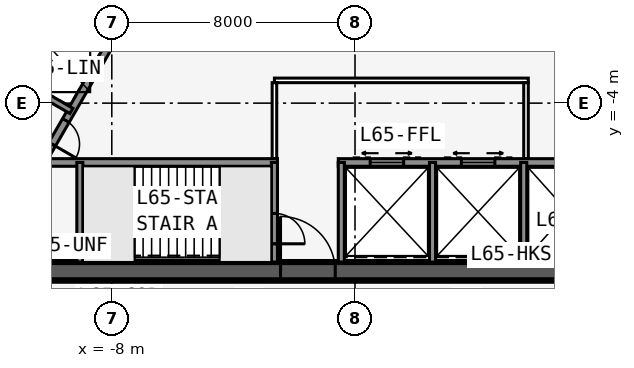
"""IFC4 building model, lengths in metres.
Left out: names, types, materials, properties, quantities, classifications, styles, units other than length and angle.
Written with IfcOpenShell. Run it as: python <this file> out.ifc"""

import sys

from ifc_helpers import new_model, si_unit, direction, frame, frame_2d, origin, place, context, subcontext, project, spatial, rectangle, extrude, element, fill, save


model = new_model("IFC4")
c1 = context("Model", 3, precision=1e-05, world=origin(), true_north=direction((0.0, 1.0)))
c2 = subcontext(c1, "Body", "Model", "MODEL_VIEW")
j1 = project(units=[si_unit("LENGTHUNIT", "METRE"), si_unit("PLANEANGLEUNIT", "RADIAN")], contexts=[c1])
p1 = place(None, origin())
s1 = spatial("IfcSite", under=j1, at=p1, CompositionType="ELEMENT")
p2 = place(p1, origin())
s2 = spatial("IfcBuilding", under=s1, at=p2, CompositionType="ELEMENT")
p3 = place(p2, frame((0.0, 0.0, 246.5)))
s3 = spatial("IfcBuildingStorey", under=s2, at=p3, CompositionType="ELEMENT", Elevation=246.5)
p4 = place(p3, frame((-16.5, -9.526, 0.0), z_axis=(0.0, 0.0, 1.0), x_axis=(1.0, 0.0, 0.0)))
e1 = element("IfcWall", 1, at=p4, inside=s3, PredefinedType="SHEAR", context=c2, shape_type="SweptSolid", body=[
    extrude(rectangle(XDim=33.0, YDim=0.6, at=frame_2d((16.5, 0.0))), origin(), (0.0, 0.0, 1.0), 3.6),
])
p5 = place(p4, frame((14.05, 0.0, 0.0)))
e2 = element("IfcOpeningElement", 2, at=p5, cuts=e1, PredefinedType="OPENING", context=c2, shape_type="SweptSolid", body=[
    extrude(rectangle(XDim=1.8, YDim=2.13, at=frame_2d((0.9, 1.065))), frame((0.0, 0.31, 0.0), z_axis=(0.0, -1.0, 0.0), x_axis=(1.0, 0.0, 0.0)), (0.0, 0.0, 1.0), 0.62),
])
p6 = place(p3, frame((-10.183, -5.951, 0.0), z_axis=(0.0, 0.0, 1.0), x_axis=(1.0, 0.0, 0.0)))
e3 = element("IfcWall", 3, at=p6, inside=s3, PredefinedType="SOLIDWALL", context=c2, shape_type="SweptSolid", body=[
    extrude(rectangle(XDim=7.633, YDim=0.25, at=frame_2d((3.816, 0.0))), origin(), (0.0, 0.0, 1.0), 3.435),
])
p7 = place(p3, frame((-0.55, -5.951, 0.0), z_axis=(0.0, 0.0, 1.0), x_axis=(1.0, 0.0, 0.0)))
e4 = element("IfcWall", 4, at=p7, inside=s3, PredefinedType="SOLIDWALL", context=c2, shape_type="SweptSolid", body=[
    extrude(rectangle(XDim=10.733, YDim=0.25, at=frame_2d((5.366, 0.0))), origin(), (0.0, 0.0, 1.0), 3.435),
])
p8 = place(p7, frame((9.314, 0.0, 0.0)))
e5 = element("IfcOpeningElement", 5, at=p8, cuts=e4, PredefinedType="OPENING", context=c2, shape_type="SweptSolid", body=[
    extrude(rectangle(XDim=0.9, YDim=2.13, at=frame_2d((0.45, 1.065))), frame((0.0, 0.135, 0.0), z_axis=(0.0, -1.0, 0.0), x_axis=(1.0, 0.0, 0.0)), (0.0, 0.0, 1.0), 0.27),
])
p9 = place(p7, frame((1.05, 0.0, 0.0)))
e6 = element("IfcOpeningElement", 6, at=p9, cuts=e4, PredefinedType="OPENING", context=c2, shape_type="SweptSolid", body=[
    extrude(rectangle(XDim=1.1, YDim=2.13, at=frame_2d((0.55, 1.065))), frame((0.0, 0.135, 0.0), z_axis=(0.0, -1.0, 0.0), x_axis=(1.0, 0.0, 0.0)), (0.0, 0.0, 1.0), 0.27),
])
p10 = place(p7, frame((4.05, 0.0, 0.0)))
e7 = element("IfcOpeningElement", 7, at=p10, cuts=e4, PredefinedType="OPENING", context=c2, shape_type="SweptSolid", body=[
    extrude(rectangle(XDim=1.1, YDim=2.13, at=frame_2d((0.55, 1.065))), frame((0.0, 0.135, 0.0), z_axis=(0.0, -1.0, 0.0), x_axis=(1.0, 0.0, 0.0)), (0.0, 0.0, 1.0), 0.27),
])
p11 = place(p3, frame((-9.05, -5.951, 0.0), z_axis=(0.0, 0.0, 1.0), x_axis=(0.0, -1.0, 0.0)))
e8 = element("IfcWall", 8, at=p11, inside=s3, PredefinedType="SOLIDWALL", context=c2, shape_type="SweptSolid", body=[
    extrude(rectangle(XDim=3.275, YDim=0.2, at=frame_2d((1.637, 0.0))), origin(), (0.0, 0.0, 1.0), 3.435),
])
p12 = place(p3, frame((-2.65, -5.951, 0.0), z_axis=(0.0, 0.0, 1.0), x_axis=(0.0, -1.0, 0.0)))
e9 = element("IfcWall", 9, at=p12, inside=s3, PredefinedType="SOLIDWALL", context=c2, shape_type="SweptSolid", body=[
    extrude(rectangle(XDim=3.275, YDim=0.2, at=frame_2d((1.637, 0.0))), origin(), (0.0, 0.0, 1.0), 3.435),
])
p13 = place(p12, frame((1.675, 0.0, 0.0)))
e10 = element("IfcOpeningElement", 10, at=p13, cuts=e9, PredefinedType="OPENING", context=c2, shape_type="SweptSolid", body=[
    extrude(rectangle(XDim=1.0, YDim=2.13, at=frame_2d((0.5, 1.065))), frame((0.0, 0.11, 0.0), z_axis=(0.0, -1.0, 0.0), x_axis=(1.0, 0.0, 0.0)), (0.0, 0.0, 1.0), 0.22),
])
for number, where, z_axis, x_axis in (
    (11, (-0.45, -5.951, 0.0), (0.0, 0.0, 1.0), (0.0, -1.0, 0.0)),
    (12, (2.55, -5.951, 0.0), (0.0, 0.0, 1.0), (0.0, -1.0, 0.0)),
    (13, (5.55, -5.951, 0.0), (0.0, 0.0, 1.0), (0.0, -1.0, 0.0)),
):
    element("IfcWall", number, at=place(p3, frame(where, z_axis=z_axis, x_axis=x_axis)), inside=s3, PredefinedType="SOLIDWALL", context=c2, shape_type="SweptSolid", body=[
        extrude(rectangle(XDim=3.275, YDim=0.2, at=frame_2d((1.637, 0.0))), origin(), (0.0, 0.0, 1.0), 3.435),
    ])
p14 = place(p3, frame((16.5, -9.526, 0.0), z_axis=(0.0, 0.0, 1.0), x_axis=(-0.499999749417, 0.866025548458, 0.0)))
e14 = element("IfcWall", 14, at=p14, inside=s3, PredefinedType="SHEAR", context=c2, shape_type="SweptSolid", body=[
    extrude(rectangle(XDim=33.0, YDim=0.6, at=frame_2d((16.5, 0.0))), origin(), (0.0, 0.0, 1.0), 3.6),
])
p15 = place(p14, frame((14.15, 0.0, 0.0)))
e15 = element("IfcOpeningElement", 15, at=p15, cuts=e14, PredefinedType="OPENING", context=c2, shape_type="SweptSolid", body=[
    extrude(rectangle(XDim=1.8, YDim=2.13, at=frame_2d((0.9, 1.065))), frame((0.0, 0.31, 0.0), z_axis=(0.0, -1.0, 0.0), x_axis=(1.0, 0.0, 0.0)), (0.0, 0.0, 1.0), 0.62),
])
p16 = place(p14, frame((12.6, 0.0, 0.0)))
e16 = element("IfcOpeningElement", 16, at=p16, cuts=e14, PredefinedType="OPENING", context=c2, shape_type="SweptSolid", body=[
    extrude(rectangle(XDim=1.0, YDim=2.13, at=frame_2d((0.5, 1.065))), frame((0.0, 0.31, 0.0), z_axis=(0.0, -1.0, 0.0), x_axis=(1.0, 0.0, 0.0)), (0.0, 0.0, 1.0), 0.62),
])
p17 = place(p3, frame((10.245, -5.843, 0.0), z_axis=(0.0, 0.0, 1.0), x_axis=(-0.499993009313, 0.866029439822, 0.0)))
e17 = element("IfcWall", 17, at=p17, inside=s3, PredefinedType="SOLIDWALL", context=c2, shape_type="SweptSolid", body=[
    extrude(rectangle(XDim=7.733, YDim=0.25, at=frame_2d((3.866, 0.0))), origin(), (0.0, 0.0, 1.0), 3.435),
])
p18 = place(p3, frame((0.0, 19.052, 0.0), z_axis=(0.0, 0.0, 1.0), x_axis=(-0.499999749417, -0.866025548458, 0.0)))
e18 = element("IfcWall", 18, at=p18, inside=s3, PredefinedType="SHEAR", context=c2, shape_type="SweptSolid", body=[
    extrude(rectangle(XDim=33.0, YDim=0.6, at=frame_2d((16.5, 0.0))), origin(), (0.0, 0.0, 1.0), 3.6),
])
p19 = place(p18, frame((14.15, 0.0, 0.0)))
e19 = element("IfcOpeningElement", 19, at=p19, cuts=e18, PredefinedType="OPENING", context=c2, shape_type="SweptSolid", body=[
    extrude(rectangle(XDim=1.8, YDim=2.13, at=frame_2d((0.9, 1.065))), frame((0.0, 0.31, 0.0), z_axis=(0.0, -1.0, 0.0), x_axis=(1.0, 0.0, 0.0)), (0.0, 0.0, 1.0), 0.62),
])
p20 = place(p18, frame((12.6, 0.0, 0.0)))
e20 = element("IfcOpeningElement", 20, at=p20, cuts=e18, PredefinedType="OPENING", context=c2, shape_type="SweptSolid", body=[
    extrude(rectangle(XDim=1.0, YDim=2.13, at=frame_2d((0.5, 1.065))), frame((0.0, 0.31, 0.0), z_axis=(0.0, -1.0, 0.0), x_axis=(1.0, 0.0, 0.0)), (0.0, 0.0, 1.0), 0.62),
])
p21 = place(p3, frame((-4.929, 3.365, 0.0), z_axis=(0.0, 0.0, 1.0), x_axis=(-0.499991433582, -0.866030349552, 0.0)))
e21 = element("IfcWall", 21, at=p21, inside=s3, PredefinedType="SOLIDWALL", context=c2, shape_type="SweptSolid", body=[
    extrude(rectangle(XDim=10.633, YDim=0.25, at=frame_2d((5.316, 0.0))), origin(), (0.0, 0.0, 1.0), 3.435),
])
p22 = place(p21, frame((9.164, 0.0, 0.0)))
e22 = element("IfcOpeningElement", 22, at=p22, cuts=e21, PredefinedType="OPENING", context=c2, shape_type="SweptSolid", body=[
    extrude(rectangle(XDim=0.9, YDim=2.13, at=frame_2d((0.45, 1.065))), frame((0.0, 0.135, 0.0), z_axis=(0.0, -1.0, 0.0), x_axis=(1.0, 0.0, 0.0)), (0.0, 0.0, 1.0), 0.27),
])
p23 = place(p21, frame((1.1, 0.0, 0.0)))
e23 = element("IfcOpeningElement", 23, at=p23, cuts=e21, PredefinedType="OPENING", context=c2, shape_type="SweptSolid", body=[
    extrude(rectangle(XDim=0.9, YDim=2.13, at=frame_2d((0.45, 1.065))), frame((0.0, 0.135, 0.0), z_axis=(0.0, -1.0, 0.0), x_axis=(1.0, 0.0, 0.0)), (0.0, 0.0, 1.0), 0.27),
])
p24 = place(p21, frame((4.0, 0.0, 0.0)))
e24 = element("IfcOpeningElement", 24, at=p24, cuts=e21, PredefinedType="OPENING", context=c2, shape_type="SweptSolid", body=[
    extrude(rectangle(XDim=0.9, YDim=2.13, at=frame_2d((0.45, 1.065))), frame((0.0, 0.135, 0.0), z_axis=(0.0, -1.0, 0.0), x_axis=(1.0, 0.0, 0.0)), (0.0, 0.0, 1.0), 0.27),
])
p25 = place(p3, frame((-9.329, -4.256, 0.0), z_axis=(0.0, 0.0, 1.0), x_axis=(-0.866027924134, 0.499995634601, 0.0)))
e25 = element("IfcWall", 25, at=p25, inside=s3, PredefinedType="SOLIDWALL", context=c2, shape_type="SweptSolid", body=[
    extrude(rectangle(XDim=3.275, YDim=0.2, at=frame_2d((1.637, 0.0))), origin(), (0.0, 0.0, 1.0), 3.435),
])
p26 = place(p3, frame((-0.35, 23.096, 0.0), z_axis=(0.0, 0.0, 1.0), x_axis=(-0.499998875317, -0.866026053119, 0.0)))
e26 = element("IfcWall", 26, at=p26, inside=s3, PredefinedType="PARTITIONING", context=c2, shape_type="SweptSolid", body=[
    extrude(rectangle(XDim=39.654, YDim=0.15, at=frame_2d((19.827, 0.0))), origin(), (0.0, 0.0, 1.0), 3.435),
])
p27 = place(p26, frame((8.652, 0.0, 0.0)))
e27 = element("IfcOpeningElement", 27, at=p27, cuts=e26, PredefinedType="OPENING", context=c2, shape_type="SweptSolid", body=[
    extrude(rectangle(XDim=0.95, YDim=2.13, at=frame_2d((0.475, 1.065))), frame((0.0, 0.085, 0.0), z_axis=(0.0, -1.0, 0.0), x_axis=(1.0, 0.0, 0.0)), (0.0, 0.0, 1.0), 0.17),
])
p28 = place(p26, frame((16.052, 0.0, 0.0)))
e28 = element("IfcOpeningElement", 28, at=p28, cuts=e26, PredefinedType="OPENING", context=c2, shape_type="SweptSolid", body=[
    extrude(rectangle(XDim=0.95, YDim=2.13, at=frame_2d((0.475, 1.065))), frame((0.0, 0.085, 0.0), z_axis=(0.0, -1.0, 0.0), x_axis=(1.0, 0.0, 0.0)), (0.0, 0.0, 1.0), 0.17),
])
p29 = place(p26, frame((23.052, 0.0, 0.0)))
e29 = element("IfcOpeningElement", 29, at=p29, cuts=e26, PredefinedType="OPENING", context=c2, shape_type="SweptSolid", body=[
    extrude(rectangle(XDim=0.95, YDim=2.13, at=frame_2d((0.475, 1.065))), frame((0.0, 0.085, 0.0), z_axis=(0.0, -1.0, 0.0), x_axis=(1.0, 0.0, 0.0)), (0.0, 0.0, 1.0), 0.17),
])
p30 = place(p26, frame((30.052, 0.0, 0.0)))
e30 = element("IfcOpeningElement", 30, at=p30, cuts=e26, PredefinedType="OPENING", context=c2, shape_type="SweptSolid", body=[
    extrude(rectangle(XDim=0.95, YDim=2.13, at=frame_2d((0.475, 1.065))), frame((0.0, 0.085, 0.0), z_axis=(0.0, -1.0, 0.0), x_axis=(1.0, 0.0, 0.0)), (0.0, 0.0, 1.0), 0.17),
])
p31 = place(p3, frame((-2.65, -3.251, 0.0), z_axis=(0.0, 0.0, 1.0), x_axis=(1.0, 0.0, 0.0)))
e31 = element("IfcWall", 31, at=p31, inside=s3, PredefinedType="PARTITIONING", context=c2, shape_type="SweptSolid", body=[
    extrude(rectangle(XDim=8.35, YDim=0.15, at=frame_2d((4.175, 0.0))), origin(), (0.0, 0.0, 1.0), 3.435),
])
for number, where, z_axis, x_axis in (
    (32, (-2.65, -5.826, 0.0), (0.0, 0.0, 1.0), (0.0, 1.0, 0.0)),
    (33, (5.625, -5.826, 0.0), (0.0, 0.0, 1.0), (0.0, 1.0, 0.0)),
):
    element("IfcWall", number, at=place(p3, frame(where, z_axis=z_axis, x_axis=x_axis)), inside=s3, PredefinedType="PARTITIONING", context=c2, shape_type="SweptSolid", body=[
        extrude(rectangle(XDim=2.5, YDim=0.15, at=frame_2d((1.25, 0.0))), origin(), (0.0, 0.0, 1.0), 3.435),
    ])
p32 = place(p3, frame((-7.247, -7.576, 0.0), z_axis=(0.0, 0.0, 1.0), x_axis=(1.0, 0.0, 0.0)))
e34 = element("IfcWall", 34, at=p32, inside=s3, PredefinedType="SOLIDWALL", context=c2, shape_type="SweptSolid", body=[
    extrude(rectangle(XDim=2.794, YDim=0.1, at=frame_2d((1.397, 0.0))), origin(), (0.0, 0.0, 1.0), 3.6),
])
p33 = place(p5, origin())
e35 = element("IfcDoor", 35, at=p33, inside=s3, OperationType="DOUBLE_DOOR_SINGLE_SWING", PredefinedType="DOOR", context=c2, shape_type="SweptSolid", body=[
    extrude(rectangle(XDim=1.8, YDim=2.13, at=frame_2d((0.9, 1.065))), frame((0.0, 0.025, 0.0), z_axis=(0.0, -1.0, 0.0), x_axis=(1.0, 0.0, 0.0)), (0.0, 0.0, 1.0), 0.05),
])
fill(e2, e35)
p34 = place(p13, origin())
e36 = element("IfcDoor", 36, at=p34, inside=s3, OperationType="SINGLE_SWING_RIGHT", PredefinedType="DOOR", context=c2, shape_type="SweptSolid", body=[
    extrude(rectangle(XDim=1.0, YDim=2.13, at=frame_2d((0.5, 1.065))), frame((0.0, 0.025, 0.0), z_axis=(0.0, -1.0, 0.0), x_axis=(1.0, 0.0, 0.0)), (0.0, 0.0, 1.0), 0.05),
])
fill(e10, e36)
p35 = place(p22, origin())
e37 = element("IfcDoor", 37, at=p35, inside=s3, OperationType="SINGLE_SWING_RIGHT", PredefinedType="DOOR", context=c2, shape_type="SweptSolid", body=[
    extrude(rectangle(XDim=0.9, YDim=2.13, at=frame_2d((0.45, 1.065))), frame((0.0, 0.025, 0.0), z_axis=(0.0, -1.0, 0.0), x_axis=(1.0, 0.0, 0.0)), (0.0, 0.0, 1.0), 0.05),
])
fill(e22, e37)
p36 = place(p9, origin())
e38 = element("IfcDoor", 38, at=p36, inside=s3, OperationType="DOUBLE_DOOR_SLIDING", PredefinedType="USERDEFINED", context=c2, shape_type="SweptSolid", body=[
    extrude(rectangle(XDim=1.1, YDim=2.13, at=frame_2d((0.55, 1.065))), frame((0.0, 0.025, 0.0), z_axis=(0.0, -1.0, 0.0), x_axis=(1.0, 0.0, 0.0)), (0.0, 0.0, 1.0), 0.05),
])
fill(e6, e38)
p37 = place(p10, origin())
e39 = element("IfcDoor", 39, at=p37, inside=s3, OperationType="DOUBLE_DOOR_SLIDING", PredefinedType="USERDEFINED", context=c2, shape_type="SweptSolid", body=[
    extrude(rectangle(XDim=1.1, YDim=2.13, at=frame_2d((0.55, 1.065))), frame((0.0, 0.025, 0.0), z_axis=(0.0, -1.0, 0.0), x_axis=(1.0, 0.0, 0.0)), (0.0, 0.0, 1.0), 0.05),
])
fill(e7, e39)
save(model, sys.argv[1])
